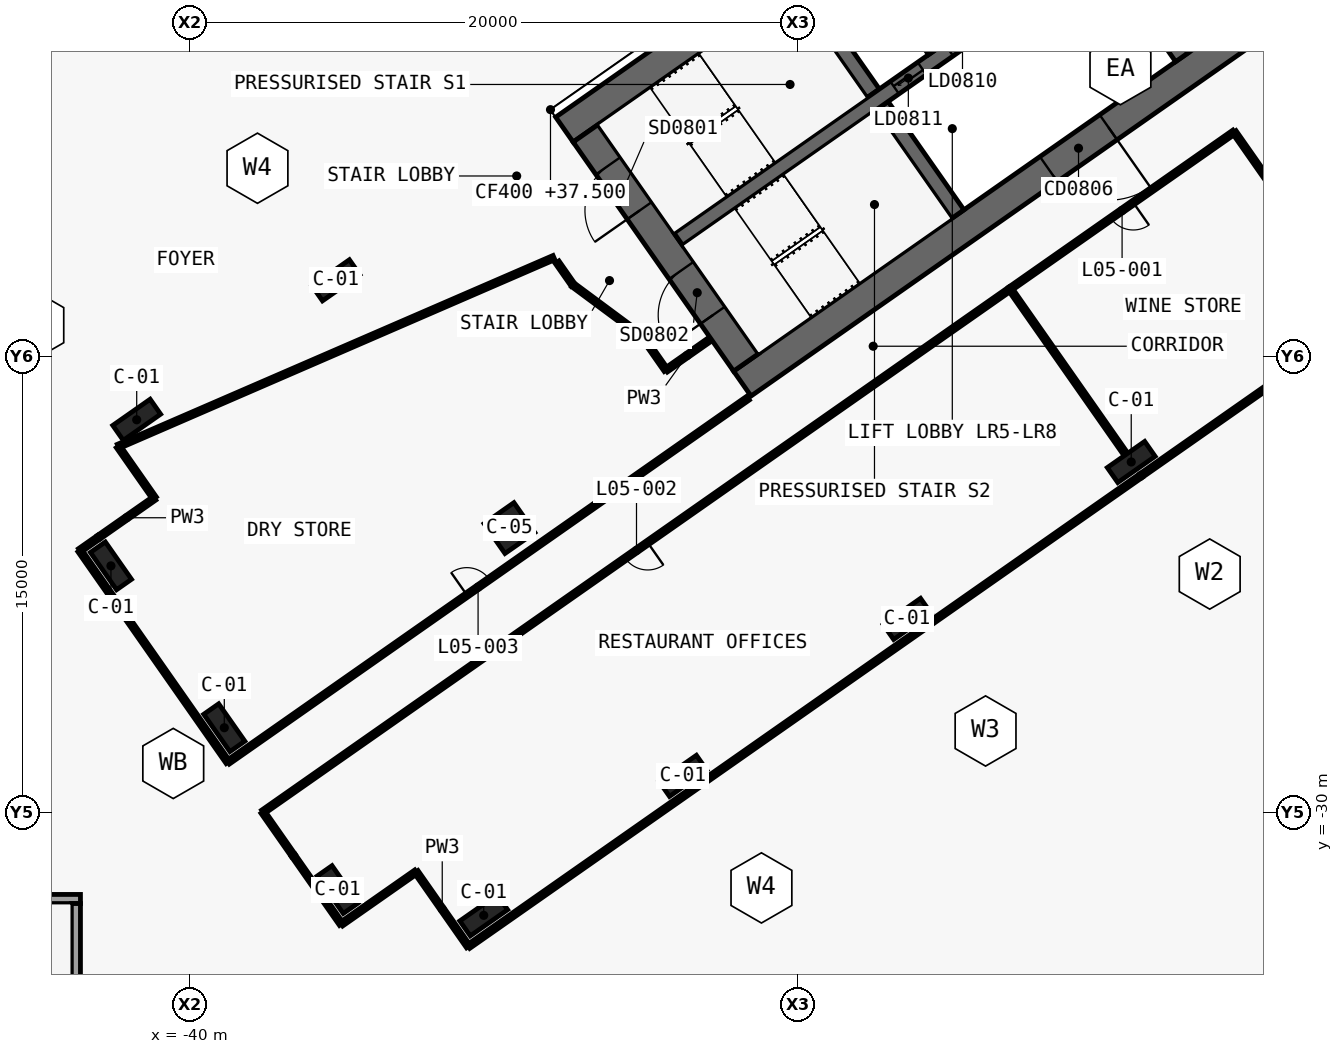
"""IFC4 building model, lengths in metres.
Left out: names, types, materials, properties, quantities, classifications, styles, units other than length and angle.
Written with IfcOpenShell. Run it as: python <this file> out.ifc"""

import sys

from ifc_helpers import new_model, si_unit, direction, frame, frame_2d, origin, origin_2d, place, context, subcontext, project, spatial, polyline, rectangle, outline, extrude, element, fill, save


model = new_model("IFC4")
c1 = context("Model", 3, precision=1e-05, world=origin(), true_north=direction((0.0, 1.0)))
c2 = subcontext(c1, "Body", "Model", "MODEL_VIEW")
j1 = project(units=[si_unit("LENGTHUNIT", "METRE"), si_unit("PLANEANGLEUNIT", "RADIAN")], contexts=[c1])
p1 = place(None, origin())
s1 = spatial("IfcSite", under=j1, at=p1, CompositionType="ELEMENT")
p2 = place(p1, origin())
s2 = spatial("IfcBuilding", under=s1, at=p2, CompositionType="ELEMENT")
p3 = place(p2, frame((0.0, 0.0, 37.5)))
s3 = spatial("IfcBuildingStorey", under=s2, at=p3, CompositionType="ELEMENT", Elevation=37.5)
p4 = place(p3, frame((0.037, 11.867, 0.0), z_axis=(0.0, 0.0, 1.0), x_axis=(-0.819155306259, -0.573571777746, 0.0)))
e1 = element("IfcWall", 1, at=p4, inside=s3, PredefinedType="SHEAR", context=c2, shape_type="SweptSolid", body=[
    extrude(outline(polyline([(33.837, 0.5), (0.7, 0.5), (0.0, -0.5), (33.837, -0.5), (33.837, 0.5)])), origin(), (0.0, 0.0, 1.0), 5.5),
])
p5 = place(p3, frame((0.037, -0.585, 0.0), z_axis=(0.0, 0.0, 1.0), x_axis=(-0.819157152511, -0.573569140985, 0.0)))
e2 = element("IfcWall", 2, at=p5, inside=s3, PredefinedType="SHEAR", context=c2, shape_type="SweptSolid", body=[
    extrude(outline(polyline([(26.695, 0.5), (0.7, 0.5), (0.0, -0.5), (26.695, -0.5), (26.695, 0.5)])), origin(), (0.0, 0.0, 1.0), 5.5),
])
p6 = place(p5, frame((2.995, 0.0, 0.0)))
e3 = element("IfcOpeningElement", 3, at=p6, cuts=e2, PredefinedType="OPENING", context=c2, shape_type="SweptSolid", body=[
    extrude(rectangle(XDim=2.4, YDim=2.1, at=frame_2d((1.2, 1.05))), frame((0.0, 0.51, 0.0), z_axis=(0.0, -1.0, 0.0), x_axis=(1.0, 0.0, 0.0)), (0.0, 0.0, 1.0), 1.02),
])
p7 = place(p5, frame((11.995, 0.0, 0.0)))
e4 = element("IfcOpeningElement", 4, at=p7, cuts=e2, PredefinedType="OPENING", context=c2, shape_type="SweptSolid", body=[
    extrude(rectangle(XDim=2.4, YDim=2.1, at=frame_2d((1.2, 1.05))), frame((0.0, 0.51, 0.0), z_axis=(0.0, -1.0, 0.0), x_axis=(1.0, 0.0, 0.0)), (0.0, 0.0, 1.0), 1.02),
])
p8 = place(p3, frame((-21.708, -15.2, 0.0), z_axis=(0.0, 0.0, 1.0), x_axis=(-0.573576324356, 0.819152122709, 0.0)))
e5 = element("IfcWall", 5, at=p8, inside=s3, PredefinedType="SHEAR", context=c2, shape_type="SweptSolid", body=[
    extrude(outline(polyline([(0.0, 0.5), (0.0, -0.5), (9.2, -0.5), (9.2, 0.5), (0.0, 0.5)])), origin(), (0.0, 0.0, 1.0), 5.5),
])
p9 = place(p8, frame((6.1, 0.0, 0.0)))
e6 = element("IfcOpeningElement", 6, at=p9, cuts=e5, PredefinedType="OPENING", context=c2, shape_type="SweptSolid", body=[
    extrude(rectangle(XDim=1.8, YDim=2.1, at=frame_2d((0.9, 1.05))), frame((0.0, 0.51, 0.0), z_axis=(0.0, -1.0, 0.0), x_axis=(1.0, 0.0, 0.0)), (0.0, 0.0, 1.0), 1.02),
])
p10 = place(p8, frame((1.9, 0.0, 0.0)))
e7 = element("IfcOpeningElement", 7, at=p10, cuts=e5, PredefinedType="OPENING", context=c2, shape_type="SweptSolid", body=[
    extrude(rectangle(XDim=1.8, YDim=2.1, at=frame_2d((0.9, 1.05))), frame((0.0, 0.51, 0.0), z_axis=(0.0, -1.0, 0.0), x_axis=(1.0, 0.0, 0.0)), (0.0, 0.0, 1.0), 1.02),
])
p11 = place(p3, frame((-7.372, -5.162, 0.0), z_axis=(0.0, 0.0, 1.0), x_axis=(-0.573594173421, 0.819139624372, 0.0)))
e8 = element("IfcWall", 8, at=p11, inside=s3, PredefinedType="SHEAR", context=c2, shape_type="SweptSolid", body=[
    extrude(outline(polyline([(4.35, 0.25), (0.0, 0.25), (0.0, -0.25), (4.35, -0.25), (4.35, 0.25)])), origin(), (0.0, 0.0, 1.0), 5.5),
])
p12 = place(p3, frame((-14.745, -10.324, 0.0), z_axis=(0.0, 0.0, 1.0), x_axis=(-0.57356780395, 0.819158088694, 0.0)))
e9 = element("IfcWall", 9, at=p12, inside=s3, PredefinedType="SHEAR", context=c2, shape_type="SweptSolid", body=[
    extrude(outline(polyline([(4.35, 0.25), (0.0, 0.25), (0.0, -0.25), (4.35, -0.25), (4.35, 0.25)])), origin(), (0.0, 0.0, 1.0), 5.5),
])
p13 = place(p3, frame((-17.527, -6.352, 0.0), z_axis=(0.0, 0.0, 1.0), x_axis=(-0.573530143085, 0.819184457233, 0.0)))
e10 = element("IfcWall", 10, at=p13, inside=s3, PredefinedType="SHEAR", context=c2, shape_type="SweptSolid", body=[
    extrude(outline(polyline([(4.35, -0.25), (4.35, 0.25), (0.0, 0.25), (0.0, -0.25), (4.35, -0.25)])), origin(), (0.0, 0.0, 1.0), 5.5),
])
p14 = place(p3, frame((-2.638, 3.768, 0.0), z_axis=(0.0, 0.0, 1.0), x_axis=(-0.819148977158, -0.573580816643, 0.0)))
e11 = element("IfcWall", 11, at=p14, inside=s3, PredefinedType="SHEAR", context=c2, shape_type="SweptSolid", body=[
    extrude(outline(polyline([(26.0, 0.25), (0.0, 0.25), (0.0, -0.25), (26.0, -0.25), (26.0, 0.25)])), origin(), (0.0, 0.0, 1.0), 5.5),
])
p15 = place(p14, frame((1.169, 0.0, 0.0)))
e12 = element("IfcOpeningElement", 12, at=p15, cuts=e11, PredefinedType="OPENING", context=c2, shape_type="SweptSolid", body=[
    extrude(rectangle(XDim=1.1, YDim=2.1, at=frame_2d((0.55, 1.05))), frame((0.0, 0.26, 0.0), z_axis=(0.0, -1.0, 0.0), x_axis=(1.0, 0.0, 0.0)), (0.0, 0.0, 1.0), 0.52),
])
p16 = place(p14, frame((3.206, 0.0, 0.0)))
e13 = element("IfcOpeningElement", 13, at=p16, cuts=e11, PredefinedType="OPENING", context=c2, shape_type="SweptSolid", body=[
    extrude(rectangle(XDim=1.1, YDim=2.1, at=frame_2d((0.55, 1.05))), frame((0.0, 0.26, 0.0), z_axis=(0.0, -1.0, 0.0), x_axis=(1.0, 0.0, 0.0)), (0.0, 0.0, 1.0), 0.52),
])
p17 = place(p14, frame((5.244, 0.0, 0.0)))
e14 = element("IfcOpeningElement", 14, at=p17, cuts=e11, PredefinedType="OPENING", context=c2, shape_type="SweptSolid", body=[
    extrude(rectangle(XDim=1.1, YDim=2.1, at=frame_2d((0.55, 1.05))), frame((0.0, 0.26, 0.0), z_axis=(0.0, -1.0, 0.0), x_axis=(1.0, 0.0, 0.0)), (0.0, 0.0, 1.0), 0.52),
])
p18 = place(p14, frame((7.281, 0.0, 0.0)))
e15 = element("IfcOpeningElement", 15, at=p18, cuts=e11, PredefinedType="OPENING", context=c2, shape_type="SweptSolid", body=[
    extrude(rectangle(XDim=1.1, YDim=2.1, at=frame_2d((0.55, 1.05))), frame((0.0, 0.26, 0.0), z_axis=(0.0, -1.0, 0.0), x_axis=(1.0, 0.0, 0.0)), (0.0, 0.0, 1.0), 0.52),
])
p19 = place(p14, frame((9.688, 0.0, 0.0)))
e16 = element("IfcOpeningElement", 16, at=p19, cuts=e11, PredefinedType="OPENING", context=c2, shape_type="SweptSolid", body=[
    extrude(rectangle(XDim=1.1, YDim=2.1, at=frame_2d((0.55, 1.05))), frame((0.0, 0.26, 0.0), z_axis=(0.0, -1.0, 0.0), x_axis=(1.0, 0.0, 0.0)), (0.0, 0.0, 1.0), 0.52),
])
p20 = place(p14, frame((11.863, 0.0, 0.0)))
e17 = element("IfcOpeningElement", 17, at=p20, cuts=e11, PredefinedType="OPENING", context=c2, shape_type="SweptSolid", body=[
    extrude(rectangle(XDim=1.1, YDim=2.1, at=frame_2d((0.55, 1.05))), frame((0.0, 0.26, 0.0), z_axis=(0.0, -1.0, 0.0), x_axis=(1.0, 0.0, 0.0)), (0.0, 0.0, 1.0), 0.52),
])
p21 = place(p14, frame((14.038, 0.0, 0.0)))
e18 = element("IfcOpeningElement", 18, at=p21, cuts=e11, PredefinedType="OPENING", context=c2, shape_type="SweptSolid", body=[
    extrude(rectangle(XDim=1.1, YDim=2.1, at=frame_2d((0.55, 1.05))), frame((0.0, 0.26, 0.0), z_axis=(0.0, -1.0, 0.0), x_axis=(1.0, 0.0, 0.0)), (0.0, 0.0, 1.0), 0.52),
])
p22 = place(p14, frame((16.212, 0.0, 0.0)))
e19 = element("IfcOpeningElement", 19, at=p22, cuts=e11, PredefinedType="OPENING", context=c2, shape_type="SweptSolid", body=[
    extrude(rectangle(XDim=1.1, YDim=2.1, at=frame_2d((0.55, 1.05))), frame((0.0, 0.26, 0.0), z_axis=(0.0, -1.0, 0.0), x_axis=(1.0, 0.0, 0.0)), (0.0, 0.0, 1.0), 0.52),
])
p23 = place(p3, frame((-49.4, -32.85, 0.0), z_axis=(0.0, 0.0, 1.0), x_axis=(1.0, 0.0, 0.0)))
e20 = element("IfcWall", 20, at=p23, inside=s3, PredefinedType="SOLIDWALL", context=c2, shape_type="SweptSolid", body=[
    extrude(rectangle(XDim=5.8, YDim=0.3, at=frame_2d((2.9, 0.0))), origin(), (0.0, 0.0, 1.0), 5.5),
])
p24 = place(p3, frame((-43.75, -43.0, 0.0), z_axis=(0.0, 0.0, 1.0), x_axis=(0.0, 1.0, 0.0)))
e21 = element("IfcWall", 21, at=p24, inside=s3, PredefinedType="SOLIDWALL", context=c2, shape_type="SweptSolid", body=[
    extrude(rectangle(XDim=10.0, YDim=0.3, at=frame_2d((5.0, 0.0))), origin(), (0.0, 0.0, 1.0), 5.5),
])
p25 = place(p24, frame((0.212, 0.0, 0.0)))
e22 = element("IfcOpeningElement", 22, at=p25, cuts=e21, PredefinedType="OPENING", context=c2, shape_type="SweptSolid", body=[
    extrude(rectangle(XDim=2.1, YDim=2.1, at=frame_2d((1.05, 1.05))), frame((0.0, 0.16, 0.0), z_axis=(0.0, -1.0, 0.0), x_axis=(1.0, 0.0, 0.0)), (0.0, 0.0, 1.0), 0.32),
])
for number, where, z_axis, x_axis in (
    (23, (-9.038, -18.475, 0.0), (0.0, 0.0, 1.0), (-0.819, -0.574, 0.0)),
    (24, (-16.41, -23.637, 0.0), (0.0, 0.0, 1.0), (-0.819, -0.574, 0.0)),
    (25, (-23.782, -28.799, 0.0), (0.0, 0.0, 1.0), (-0.819, -0.574, 0.0)),
    (26, (-30.336, -33.388, 0.0), (0.0, 0.0, 1.0), (-0.819, -0.574, 0.0)),
    (27, (-35.197, -12.498, 0.0), (0.0, 0.0, 1.0), (-0.819, -0.574, 0.0)),
    (28, (-41.75, -17.087, 0.0), (0.0, 0.0, 1.0), (-0.819, -0.574, 0.0)),
    (29, (-35.14, -32.541, 0.0), (0.0, 0.0, 1.0), (-0.574, 0.819, 0.0)),
    (30, (-38.869, -27.216, 0.0), (0.0, 0.0, 1.0), (-0.574, 0.819, 0.0)),
    (31, (-42.597, -21.892, 0.0), (0.0, 0.0, 1.0), (-0.574, 0.819, 0.0)),
):
    element("IfcColumn", number, at=place(p3, frame(where, z_axis=z_axis, x_axis=x_axis)), inside=s3, PredefinedType="COLUMN", context=c2, shape_type="SweptSolid", body=[
        extrude(rectangle(XDim=1.5, YDim=0.6, at=origin_2d()), origin(), (0.0, 0.0, 1.0), 5.5),
    ])
p26 = place(p3, frame((-29.49, -20.649, 0.0), z_axis=(0.0, 0.0, 1.0), x_axis=(-0.819152044289, -0.573576436351, 0.0)))
e32 = element("IfcColumn", 32, at=p26, inside=s3, PredefinedType="COLUMN", context=c2, shape_type="SweptSolid", body=[
    extrude(rectangle(XDim=1.2, YDim=1.2, at=origin_2d()), origin(), (0.0, 0.0, 1.0), 5.5),
])
p27 = place(p3, frame((-15.622, -5.018, 0.0), z_axis=(0.0, 0.0, 1.0), x_axis=(-0.573594173421, 0.819139624372, 0.0)))
e33 = element("IfcWall", 33, at=p27, inside=s3, PredefinedType="SOLIDWALL", context=c2, shape_type="SweptSolid", body=[
    extrude(rectangle(XDim=4.35, YDim=0.2, at=frame_2d((2.175, 0.0))), origin(), (0.0, 0.0, 1.0), 5.5),
])
p28 = place(p3, frame((-38.746, -28.351, 0.0), z_axis=(0.0, 0.0, 1.0), x_axis=(0.819148965066, 0.573580833911, 0.0)))
e34 = element("IfcWall", 34, at=p28, inside=s3, PredefinedType="PARTITIONING", context=c2, shape_type="SweptSolid", body=[
    extrude(rectangle(XDim=20.88, YDim=0.15, at=frame_2d((10.44, 0.0))), origin(), (0.0, 0.0, 1.0), 3.68),
])
p29 = place(p28, frame((9.59, 0.0, 0.0)))
e35 = element("IfcOpeningElement", 35, at=p29, cuts=e34, PredefinedType="OPENING", context=c2, shape_type="SweptSolid", body=[
    extrude(rectangle(XDim=0.9, YDim=2.1, at=frame_2d((0.45, 1.05))), frame((0.0, 0.085, 0.0), z_axis=(0.0, -1.0, 0.0), x_axis=(1.0, 0.0, 0.0)), (0.0, 0.0, 1.0), 0.17),
])
p30 = place(p3, frame((-5.652, -7.62, 0.0), z_axis=(0.0, 0.0, 1.0), x_axis=(-0.81915291695, -0.57357519006, 0.0)))
e36 = element("IfcWall", 36, at=p30, inside=s3, PredefinedType="PARTITIONING", context=c2, shape_type="SweptSolid", body=[
    extrude(rectangle(XDim=9.002, YDim=0.15, at=frame_2d((4.501, 0.0))), origin(), (0.0, 0.0, 1.0), 3.68),
])
p31 = place(p30, frame((4.051, 0.0, 0.0)))
e37 = element("IfcOpeningElement", 37, at=p31, cuts=e36, PredefinedType="OPENING", context=c2, shape_type="SweptSolid", body=[
    extrude(rectangle(XDim=0.9, YDim=2.1, at=frame_2d((0.45, 1.05))), frame((0.0, 0.085, 0.0), z_axis=(0.0, -1.0, 0.0), x_axis=(1.0, 0.0, 0.0)), (0.0, 0.0, 1.0), 0.17),
])
p32 = place(p3, frame((-13.022, -12.781, 0.0), z_axis=(0.0, 0.0, 1.0), x_axis=(-0.819154688631, -0.57357265982, 0.0)))
e38 = element("IfcWall", 38, at=p32, inside=s3, PredefinedType="PARTITIONING", context=c2, shape_type="SweptSolid", body=[
    extrude(rectangle(XDim=30.002, YDim=0.15, at=frame_2d((15.001, 0.0))), origin(), (0.0, 0.0, 1.0), 3.68),
])
p33 = place(p32, frame((14.551, 0.0, 0.0)))
e39 = element("IfcOpeningElement", 39, at=p33, cuts=e38, PredefinedType="OPENING", context=c2, shape_type="SweptSolid", body=[
    extrude(rectangle(XDim=0.9, YDim=2.1, at=frame_2d((0.45, 1.05))), frame((0.0, 0.085, 0.0), z_axis=(0.0, -1.0, 0.0), x_axis=(1.0, 0.0, 0.0)), (0.0, 0.0, 1.0), 0.17),
])
p34 = place(p3, frame((-8.723, -18.927, 0.0), z_axis=(0.0, 0.0, 1.0), x_axis=(0.81913387212, 0.573602388024, 0.0)))
e40 = element("IfcWall", 40, at=p34, inside=s3, PredefinedType="PARTITIONING", context=c2, shape_type="SweptSolid", body=[
    extrude(rectangle(XDim=6.552, YDim=0.15, at=frame_2d((3.276, 0.0))), origin(), (0.0, 0.0, 1.0), 5.1),
])
p35 = place(p3, frame((-35.017, -33.676, 0.0), z_axis=(0.0, 0.0, 1.0), x_axis=(0.81917072002, 0.573549763719, 0.0)))
e41 = element("IfcWall", 41, at=p35, inside=s3, PredefinedType="PARTITIONING", context=c2, shape_type="SweptSolid", body=[
    extrude(rectangle(XDim=2.999, YDim=0.15, at=frame_2d((1.5, 0.0))), origin(), (0.0, 0.0, 1.0), 3.88),
])
p36 = place(p3, frame((-32.56, -31.956, 0.0), z_axis=(0.0, 0.0, 1.0), x_axis=(0.573604390867, -0.819132469615, 0.0)))
e42 = element("IfcWall", 42, at=p36, inside=s3, PredefinedType="PARTITIONING", context=c2, shape_type="SweptSolid", body=[
    extrude(rectangle(XDim=2.999, YDim=0.15, at=frame_2d((1.5, 0.0))), origin(), (0.0, 0.0, 1.0), 3.88),
])
p37 = place(p3, frame((-30.839, -34.413, 0.0), z_axis=(0.0, 0.0, 1.0), x_axis=(0.819150779762, 0.573578242279, 0.0)))
e43 = element("IfcWall", 43, at=p37, inside=s3, PredefinedType="PARTITIONING", context=c2, shape_type="SweptSolid", body=[
    extrude(rectangle(XDim=27.002, YDim=0.15, at=frame_2d((13.501, 0.0))), origin(), (0.0, 0.0, 1.0), 4.08),
])
p38 = place(p3, frame((-36.599, -31.418, 0.0), z_axis=(0.0, 0.0, 1.0), x_axis=(0.57362881286, -0.819115367367, 0.0)))
e44 = element("IfcWall", 44, at=p38, inside=s3, PredefinedType="PARTITIONING", context=c2, shape_type="SweptSolid", body=[
    extrude(rectangle(XDim=2.756, YDim=0.15, at=frame_2d((1.378, 0.0))), origin(), (0.0, 0.0, 1.0), 5.1),
])
p39 = place(p3, frame((-42.359, -17.961, 0.0), z_axis=(0.0, 0.0, 1.0), x_axis=(0.573603984281, -0.819132754331, 0.0)))
e45 = element("IfcWall", 45, at=p39, inside=s3, PredefinedType="PARTITIONING", context=c2, shape_type="SweptSolid", body=[
    extrude(rectangle(XDim=2.082, YDim=0.15, at=frame_2d((1.041, 0.0))), origin(), (0.0, 0.0, 1.0), 3.88),
])
p40 = place(p3, frame((-41.165, -19.667, 0.0), z_axis=(0.0, 0.0, 1.0), x_axis=(-0.819149945048, -0.573579434366, 0.0)))
e46 = element("IfcWall", 46, at=p40, inside=s3, PredefinedType="PARTITIONING", context=c2, shape_type="SweptSolid", body=[
    extrude(rectangle(XDim=2.239, YDim=0.15, at=frame_2d((1.119, 0.0))), origin(), (0.0, 0.0, 1.0), 3.88),
])
p41 = place(p3, frame((-43.622, -21.387, 0.0), z_axis=(0.0, 0.0, 1.0), x_axis=(0.573487395822, -0.819214383928, 0.0)))
e47 = element("IfcWall", 47, at=p41, inside=s3, PredefinedType="PARTITIONING", context=c2, shape_type="SweptSolid", body=[
    extrude(rectangle(XDim=8.503, YDim=0.15, at=frame_2d((4.251, 0.0))), origin(), (0.0, 0.0, 1.0), 5.1),
])
p42 = place(p3, frame((-43.0, -20.952, 0.0), z_axis=(0.0, 0.0, 1.0), x_axis=(-0.819216809636, -0.573483930734, 0.0)))
e48 = element("IfcWall", 48, at=p42, inside=s3, PredefinedType="PARTITIONING", context=c2, shape_type="SweptSolid", body=[
    extrude(rectangle(XDim=0.759, YDim=0.15, at=frame_2d((0.379, 0.0))), origin(), (0.0, 0.0, 1.0), 5.1),
])
p43 = place(p3, frame((-37.6, -29.988, 0.0), z_axis=(0.0, 0.0, 1.0), x_axis=(0.573518712821, -0.819192459709, 0.0)))
e49 = element("IfcWall", 49, at=p43, inside=s3, PredefinedType="PARTITIONING", context=c2, shape_type="SweptSolid", body=[
    extrude(rectangle(XDim=1.744, YDim=0.15, at=frame_2d((0.872, 0.0))), origin(), (0.0, 0.0, 1.0), 5.1),
])
p44 = place(p3, frame((-1.849, -13.051, 0.0), z_axis=(0.0, 0.0, 1.0), x_axis=(-0.573575988258, 0.819152358047, 0.0)))
e50 = element("IfcWall", 50, at=p44, inside=s3, PredefinedType="PARTITIONING", context=c2, shape_type="SweptSolid", body=[
    extrude(rectangle(XDim=6.632, YDim=0.15, at=frame_2d((3.316, 0.0))), origin(), (0.0, 0.0, 1.0), 3.68),
])
p45 = place(p3, frame((-28.026, -11.751, 0.0), z_axis=(0.0, 0.0, 1.0), x_axis=(-0.91753357696, -0.397658314577, 0.0)))
e51 = element("IfcWall", 51, at=p45, inside=s3, PredefinedType="PARTITIONING", context=c2, shape_type="SweptSolid", body=[
    extrude(rectangle(XDim=15.621, YDim=0.15, at=frame_2d((7.811, 0.0))), origin(), (0.0, 0.0, 1.0), 3.68),
])
p46 = place(p3, frame((-22.961, -14.49, 0.0), z_axis=(0.0, 0.0, 1.0), x_axis=(-0.819109000826, -0.573637903879, 0.0)))
e52 = element("IfcWall", 52, at=p46, inside=s3, PredefinedType="PARTITIONING", context=c2, shape_type="SweptSolid", body=[
    extrude(rectangle(XDim=1.68, YDim=0.15, at=frame_2d((0.84, 0.0))), origin(), (0.0, 0.0, 1.0), 5.1),
])
p47 = place(p3, frame((-24.337, -15.454, 0.0), z_axis=(0.0, 0.0, 1.0), x_axis=(-0.573571252353, 0.819155674139, 0.0)))
e53 = element("IfcWall", 53, at=p47, inside=s3, PredefinedType="PARTITIONING", context=c2, shape_type="SweptSolid", body=[
    extrude(rectangle(XDim=1.354, YDim=0.15, at=frame_2d((0.677, 0.0))), origin(), (0.0, 0.0, 1.0), 5.1),
])
p48 = place(p3, frame((-25.114, -14.345, 0.0), z_axis=(0.0, 0.0, 1.0), x_axis=(-0.803169525988, 0.59575054555, 0.0)))
e54 = element("IfcWall", 54, at=p48, inside=s3, PredefinedType="PARTITIONING", context=c2, shape_type="SweptSolid", body=[
    extrude(rectangle(XDim=2.846, YDim=0.15, at=frame_2d((1.423, 0.0))), origin(), (0.0, 0.0, 1.0), 5.1),
])
p49 = place(p3, frame((-27.4, -12.649, 0.0), z_axis=(0.0, 0.0, 1.0), x_axis=(-0.573713979357, 0.819055718428, 0.0)))
e55 = element("IfcWall", 55, at=p49, inside=s3, PredefinedType="PARTITIONING", context=c2, shape_type="SweptSolid", body=[
    extrude(rectangle(XDim=0.912, YDim=0.15, at=frame_2d((0.456, 0.0))), origin(), (0.0, 0.0, 1.0), 5.1),
])
p50 = place(p3, frame((-9.221, -18.213, 0.0), z_axis=(0.0, 0.0, 1.0), x_axis=(-0.573556251799, 0.819166177294, 0.0)))
e56 = element("IfcWall", 56, at=p50, inside=s3, PredefinedType="PARTITIONING", context=c2, shape_type="SweptSolid", body=[
    extrude(rectangle(XDim=6.63, YDim=0.15, at=frame_2d((3.315, 0.0))), origin(), (0.0, 0.0, 1.0), 3.68),
])
p51 = place(p22, origin())
e57 = element("IfcDoor", 57, at=p51, inside=s3, OperationType="SLIDING_TO_RIGHT", PredefinedType="DOOR", context=c2, shape_type="SweptSolid", body=[
    extrude(rectangle(XDim=1.1, YDim=2.1, at=frame_2d((0.55, 1.05))), frame((0.0, 0.025, 0.0), z_axis=(0.0, -1.0, 0.0), x_axis=(1.0, 0.0, 0.0)), (0.0, 0.0, 1.0), 0.05),
])
fill(e19, e57)
p52 = place(p7, origin())
e58 = element("IfcDoor", 58, at=p52, inside=s3, OperationType="DOUBLE_DOOR_SINGLE_SWING", PredefinedType="DOOR", context=c2, shape_type="SweptSolid", body=[
    extrude(rectangle(XDim=2.4, YDim=2.1, at=frame_2d((1.2, 1.05))), frame((0.0, 0.025, 0.0), z_axis=(0.0, -1.0, 0.0), x_axis=(1.0, 0.0, 0.0)), (0.0, 0.0, 1.0), 0.05),
])
fill(e4, e58)
p53 = place(p9, origin())
e59 = element("IfcDoor", 59, at=p53, inside=s3, OperationType="DOUBLE_DOOR_SINGLE_SWING", PredefinedType="DOOR", context=c2, shape_type="SweptSolid", body=[
    extrude(rectangle(XDim=1.8, YDim=2.1, at=frame_2d((0.9, 1.05))), frame((0.0, 0.025, 0.0), z_axis=(0.0, -1.0, 0.0), x_axis=(1.0, 0.0, 0.0)), (0.0, 0.0, 1.0), 0.05),
])
fill(e6, e59)
p54 = place(p10, origin())
e60 = element("IfcDoor", 60, at=p54, inside=s3, OperationType="DOUBLE_DOOR_SINGLE_SWING", PredefinedType="DOOR", context=c2, shape_type="SweptSolid", body=[
    extrude(rectangle(XDim=1.8, YDim=2.1, at=frame_2d((0.9, 1.05))), frame((0.0, 0.025, 0.0), z_axis=(0.0, -1.0, 0.0), x_axis=(1.0, 0.0, 0.0)), (0.0, 0.0, 1.0), 0.05),
])
fill(e7, e60)
p55 = place(p31, origin())
e61 = element("IfcDoor", 61, at=p55, inside=s3, OperationType="SINGLE_SWING_RIGHT", PredefinedType="DOOR", context=c2, shape_type="SweptSolid", body=[
    extrude(rectangle(XDim=0.9, YDim=2.1, at=frame_2d((0.45, 1.05))), frame((0.0, 0.025, 0.0), z_axis=(0.0, -1.0, 0.0), x_axis=(1.0, 0.0, 0.0)), (0.0, 0.0, 1.0), 0.05),
])
fill(e37, e61)
p56 = place(p33, origin())
e62 = element("IfcDoor", 62, at=p56, inside=s3, OperationType="SINGLE_SWING_RIGHT", PredefinedType="DOOR", context=c2, shape_type="SweptSolid", body=[
    extrude(rectangle(XDim=0.9, YDim=2.1, at=frame_2d((0.45, 1.05))), frame((0.0, 0.025, 0.0), z_axis=(0.0, -1.0, 0.0), x_axis=(1.0, 0.0, 0.0)), (0.0, 0.0, 1.0), 0.05),
])
fill(e39, e62)
p57 = place(p29, origin())
e63 = element("IfcDoor", 63, at=p57, inside=s3, OperationType="SINGLE_SWING_LEFT", PredefinedType="DOOR", context=c2, shape_type="SweptSolid", body=[
    extrude(rectangle(XDim=0.9, YDim=2.1, at=frame_2d((0.45, 1.05))), frame((0.0, 0.025, 0.0), z_axis=(0.0, -1.0, 0.0), x_axis=(1.0, 0.0, 0.0)), (0.0, 0.0, 1.0), 0.05),
])
fill(e35, e63)
save(model, sys.argv[1])
